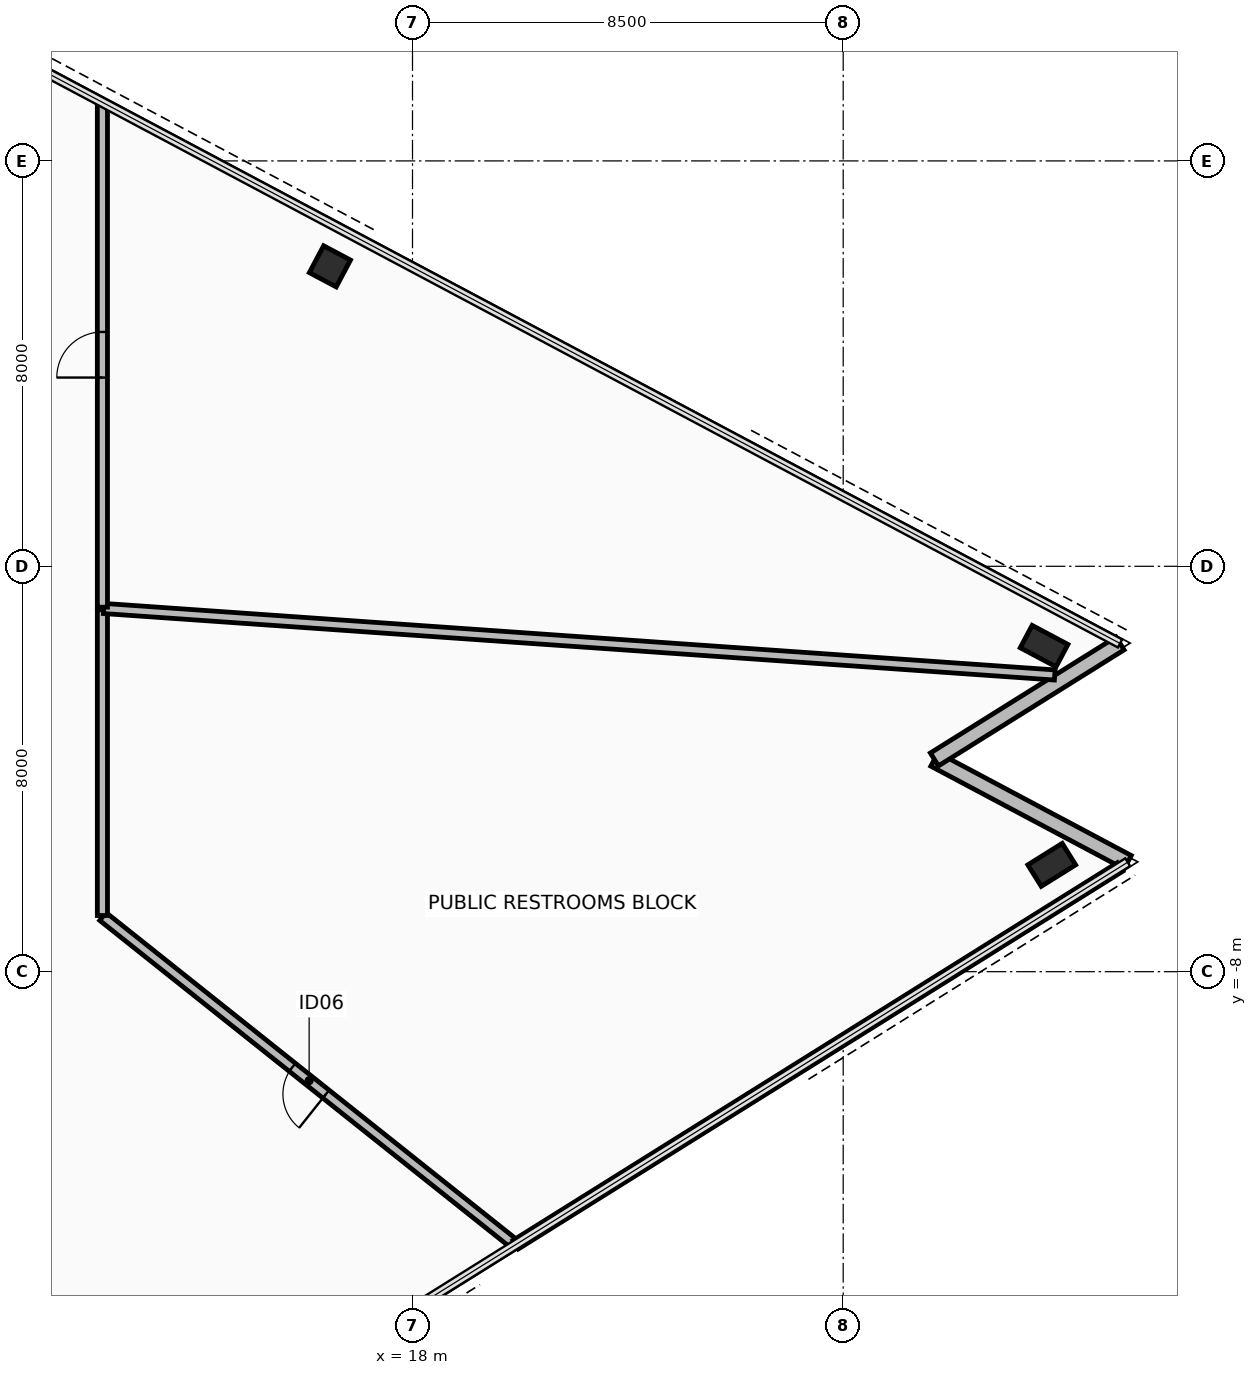
"""IFC4 building model, lengths in metres.
Left out: names, types, materials, properties, quantities, classifications, styles, units other than length and angle.
Written with IfcOpenShell. Run it as: python <this file> out.ifc"""

import sys

from ifc_helpers import new_model, si_unit, direction, frame, frame_2d, origin, origin_2d, place, context, subcontext, project, spatial, rectangle, hollow_rectangle, extrude, element, fill, save


model = new_model("IFC4")
c1 = context("Model", 3, precision=1e-05, world=origin(), true_north=direction((0.0, 1.0)))
c2 = subcontext(c1, "Body", "Model", "MODEL_VIEW")
j1 = project(units=[si_unit("LENGTHUNIT", "METRE"), si_unit("PLANEANGLEUNIT", "RADIAN")], contexts=[c1])
p1 = place(None, origin())
s1 = spatial("IfcSite", under=j1, at=p1, CompositionType="ELEMENT")
p2 = place(p1, origin())
s2 = spatial("IfcBuilding", under=s1, at=p2, CompositionType="ELEMENT")
p3 = place(p2, frame((0.0, 0.0, 142.4)))
s3 = spatial("IfcBuildingStorey", under=s2, at=p3, CompositionType="ELEMENT", Elevation=142.4)
for number, where, z_axis, x_axis in (
    (1, (30.615, -5.892, 0.0), (0.0, 0.0, 1.0), (0.848, 0.53, 0.0)),
    (2, (30.465, -1.575, 0.0), (0.0, 0.0, 1.0), (-0.883, 0.469, 0.0)),
):
    element("IfcColumn", number, at=place(p3, frame(where, z_axis=z_axis, x_axis=x_axis)), inside=s3, PredefinedType="COLUMN", context=c2, shape_type="SweptSolid", body=[
        extrude(hollow_rectangle(XDim=0.5, YDim=0.8, WallThickness=0.04, at=origin_2d()), origin(), (0.0, 0.0, 1.0), 3.6),
    ])
p4 = place(p3, frame((16.37, 5.919, 0.0), z_axis=(0.0, 0.0, 1.0), x_axis=(-0.88294841224, 0.469470021751, 0.0)))
e3 = element("IfcColumn", 3, at=p4, inside=s3, PredefinedType="COLUMN", context=c2, shape_type="SweptSolid", body=[
    extrude(hollow_rectangle(XDim=0.6, YDim=0.6, WallThickness=0.036, at=origin_2d()), origin(), (0.0, 0.0, 1.0), 3.6),
])
p5 = place(p3, frame((32.115, -5.84, 0.0), z_axis=(0.0, 0.0, 1.0), x_axis=(-0.882945167019, 0.469476125099, 0.0)))
e4 = element("IfcWall", 4, at=p5, inside=s3, PredefinedType="STANDARD", context=c2, shape_type="SweptSolid", body=[
    extrude(rectangle(XDim=4.32, YDim=0.3, at=frame_2d((2.16, 0.0))), origin(), (0.0, 0.0, 1.0), 2.705),
])
p6 = place(p3, frame((28.3, -3.812, 0.0), z_axis=(0.0, 0.0, 1.0), x_axis=(0.848042749904, 0.529927819929, 0.0)))
e5 = element("IfcWall", 5, at=p6, inside=s3, PredefinedType="STANDARD", context=c2, shape_type="SweptSolid", body=[
    extrude(rectangle(XDim=4.32, YDim=0.3, at=frame_2d((2.16, 0.0))), origin(), (0.0, 0.0, 1.0), 2.705),
])
p7 = place(p3, frame((20.03, -13.391, 0.0), z_axis=(0.0, 0.0, 1.0), x_axis=(-0.782379652936, 0.622801797261, 0.0)))
e6 = element("IfcWall", 6, at=p7, inside=s3, PredefinedType="PARTITIONING", context=c2, shape_type="SweptSolid", body=[
    extrude(rectangle(XDim=10.405, YDim=0.2, at=frame_2d((5.203, 0.0))), origin(), (0.0, 0.0, 1.0), 2.705),
])
p8 = place(p7, frame((4.777, 0.0, 0.0)))
e7 = element("IfcOpeningElement", 7, at=p8, cuts=e6, PredefinedType="OPENING", context=c2, shape_type="SweptSolid", body=[
    extrude(rectangle(XDim=0.85, YDim=2.1, at=frame_2d((0.425, 1.05))), frame((0.0, 0.11, 0.0), z_axis=(0.0, -1.0, 0.0), x_axis=(1.0, 0.0, 0.0)), (0.0, 0.0, 1.0), 0.22),
])
p9 = place(p3, frame((11.88, -6.891, 0.0), z_axis=(0.0, 0.0, 1.0), x_axis=(0.0, 1.0, 0.0)))
e8 = element("IfcWall", 8, at=p9, inside=s3, PredefinedType="PARTITIONING", context=c2, shape_type="SweptSolid", body=[
    extrude(rectangle(XDim=6.034, YDim=0.2, at=frame_2d((3.017, 0.0))), origin(), (0.0, 0.0, 1.0), 2.855),
])
p10 = place(p3, frame((11.907, -0.833, 0.0), z_axis=(0.0, 0.0, 1.0), x_axis=(0.997563710426, -0.069761333428, 0.0)))
e9 = element("IfcWall", 9, at=p10, inside=s3, PredefinedType="PARTITIONING", context=c2, shape_type="SweptSolid", body=[
    extrude(rectangle(XDim=18.814, YDim=0.2, at=frame_2d((9.407, 0.0))), origin(), (0.0, 0.0, 1.0), 2.705),
])
p11 = place(p3, frame((31.963, -5.935, 0.0), z_axis=(0.0, 0.0, 1.0), x_axis=(-0.848057783803, -0.529903760442, 0.0)))
e10 = element("IfcWall", 10, at=p11, inside=s3, PredefinedType="PARTITIONING", context=c2, shape_type="SweptSolid", body=[
    extrude(rectangle(XDim=14.065, YDim=0.2, at=frame_2d((7.032, 0.0))), origin(), (0.0, 0.0, 1.0), 3.41),
])
p12 = place(p3, frame((7.694, -10.59, 0.0), z_axis=(0.0, 0.0, 1.0), x_axis=(0.587773963439, -0.809025196086, 0.0)))
e11 = element("IfcWall", 11, at=p12, inside=s3, PredefinedType="PARTITIONING", context=c2, shape_type="SweptSolid", body=[
    extrude(rectangle(XDim=8.907, YDim=0.2, at=frame_2d((4.454, 0.0))), origin(), (0.0, 0.0, 1.0), 2.705),
])
p13 = place(p3, frame((11.88, -0.807, 0.0), z_axis=(0.0, 0.0, 1.0), x_axis=(0.0, 1.0, 0.0)))
e12 = element("IfcWall", 12, at=p13, inside=s3, PredefinedType="PARTITIONING", context=c2, shape_type="SweptSolid", body=[
    extrude(rectangle(XDim=9.964, YDim=0.2, at=frame_2d((4.982, 0.0))), origin(), (0.0, 0.0, 1.0), 2.705),
])
p14 = place(p13, frame((4.532, 0.0, 0.0)))
e13 = element("IfcOpeningElement", 13, at=p14, cuts=e12, PredefinedType="OPENING", context=c2, shape_type="SweptSolid", body=[
    extrude(rectangle(XDim=0.9, YDim=2.1, at=frame_2d((0.45, 1.05))), frame((0.0, 0.11, 0.0), z_axis=(0.0, -1.0, 0.0), x_axis=(1.0, 0.0, 0.0)), (0.0, 0.0, 1.0), 0.22),
])
p15 = place(p8, origin())
e14 = element("IfcDoor", 14, at=p15, inside=s3, OperationType="SINGLE_SWING_RIGHT", PredefinedType="DOOR", context=c2, shape_type="SweptSolid", body=[
    extrude(rectangle(XDim=0.85, YDim=2.1, at=frame_2d((0.425, 1.05))), frame((0.0, 0.025, 0.0), z_axis=(0.0, -1.0, 0.0), x_axis=(1.0, 0.0, 0.0)), (0.0, 0.0, 1.0), 0.05),
])
fill(e7, e14)
p16 = place(p14, origin())
e15 = element("IfcDoor", 15, at=p16, inside=s3, OperationType="SINGLE_SWING_LEFT", PredefinedType="DOOR", context=c2, shape_type="SweptSolid", body=[
    extrude(rectangle(XDim=0.9, YDim=2.1, at=frame_2d((0.45, 1.05))), frame((0.0, 0.025, 0.0), z_axis=(0.0, -1.0, 0.0), x_axis=(1.0, 0.0, 0.0)), (0.0, 0.0, 1.0), 0.05),
])
fill(e13, e15)
save(model, sys.argv[1])
